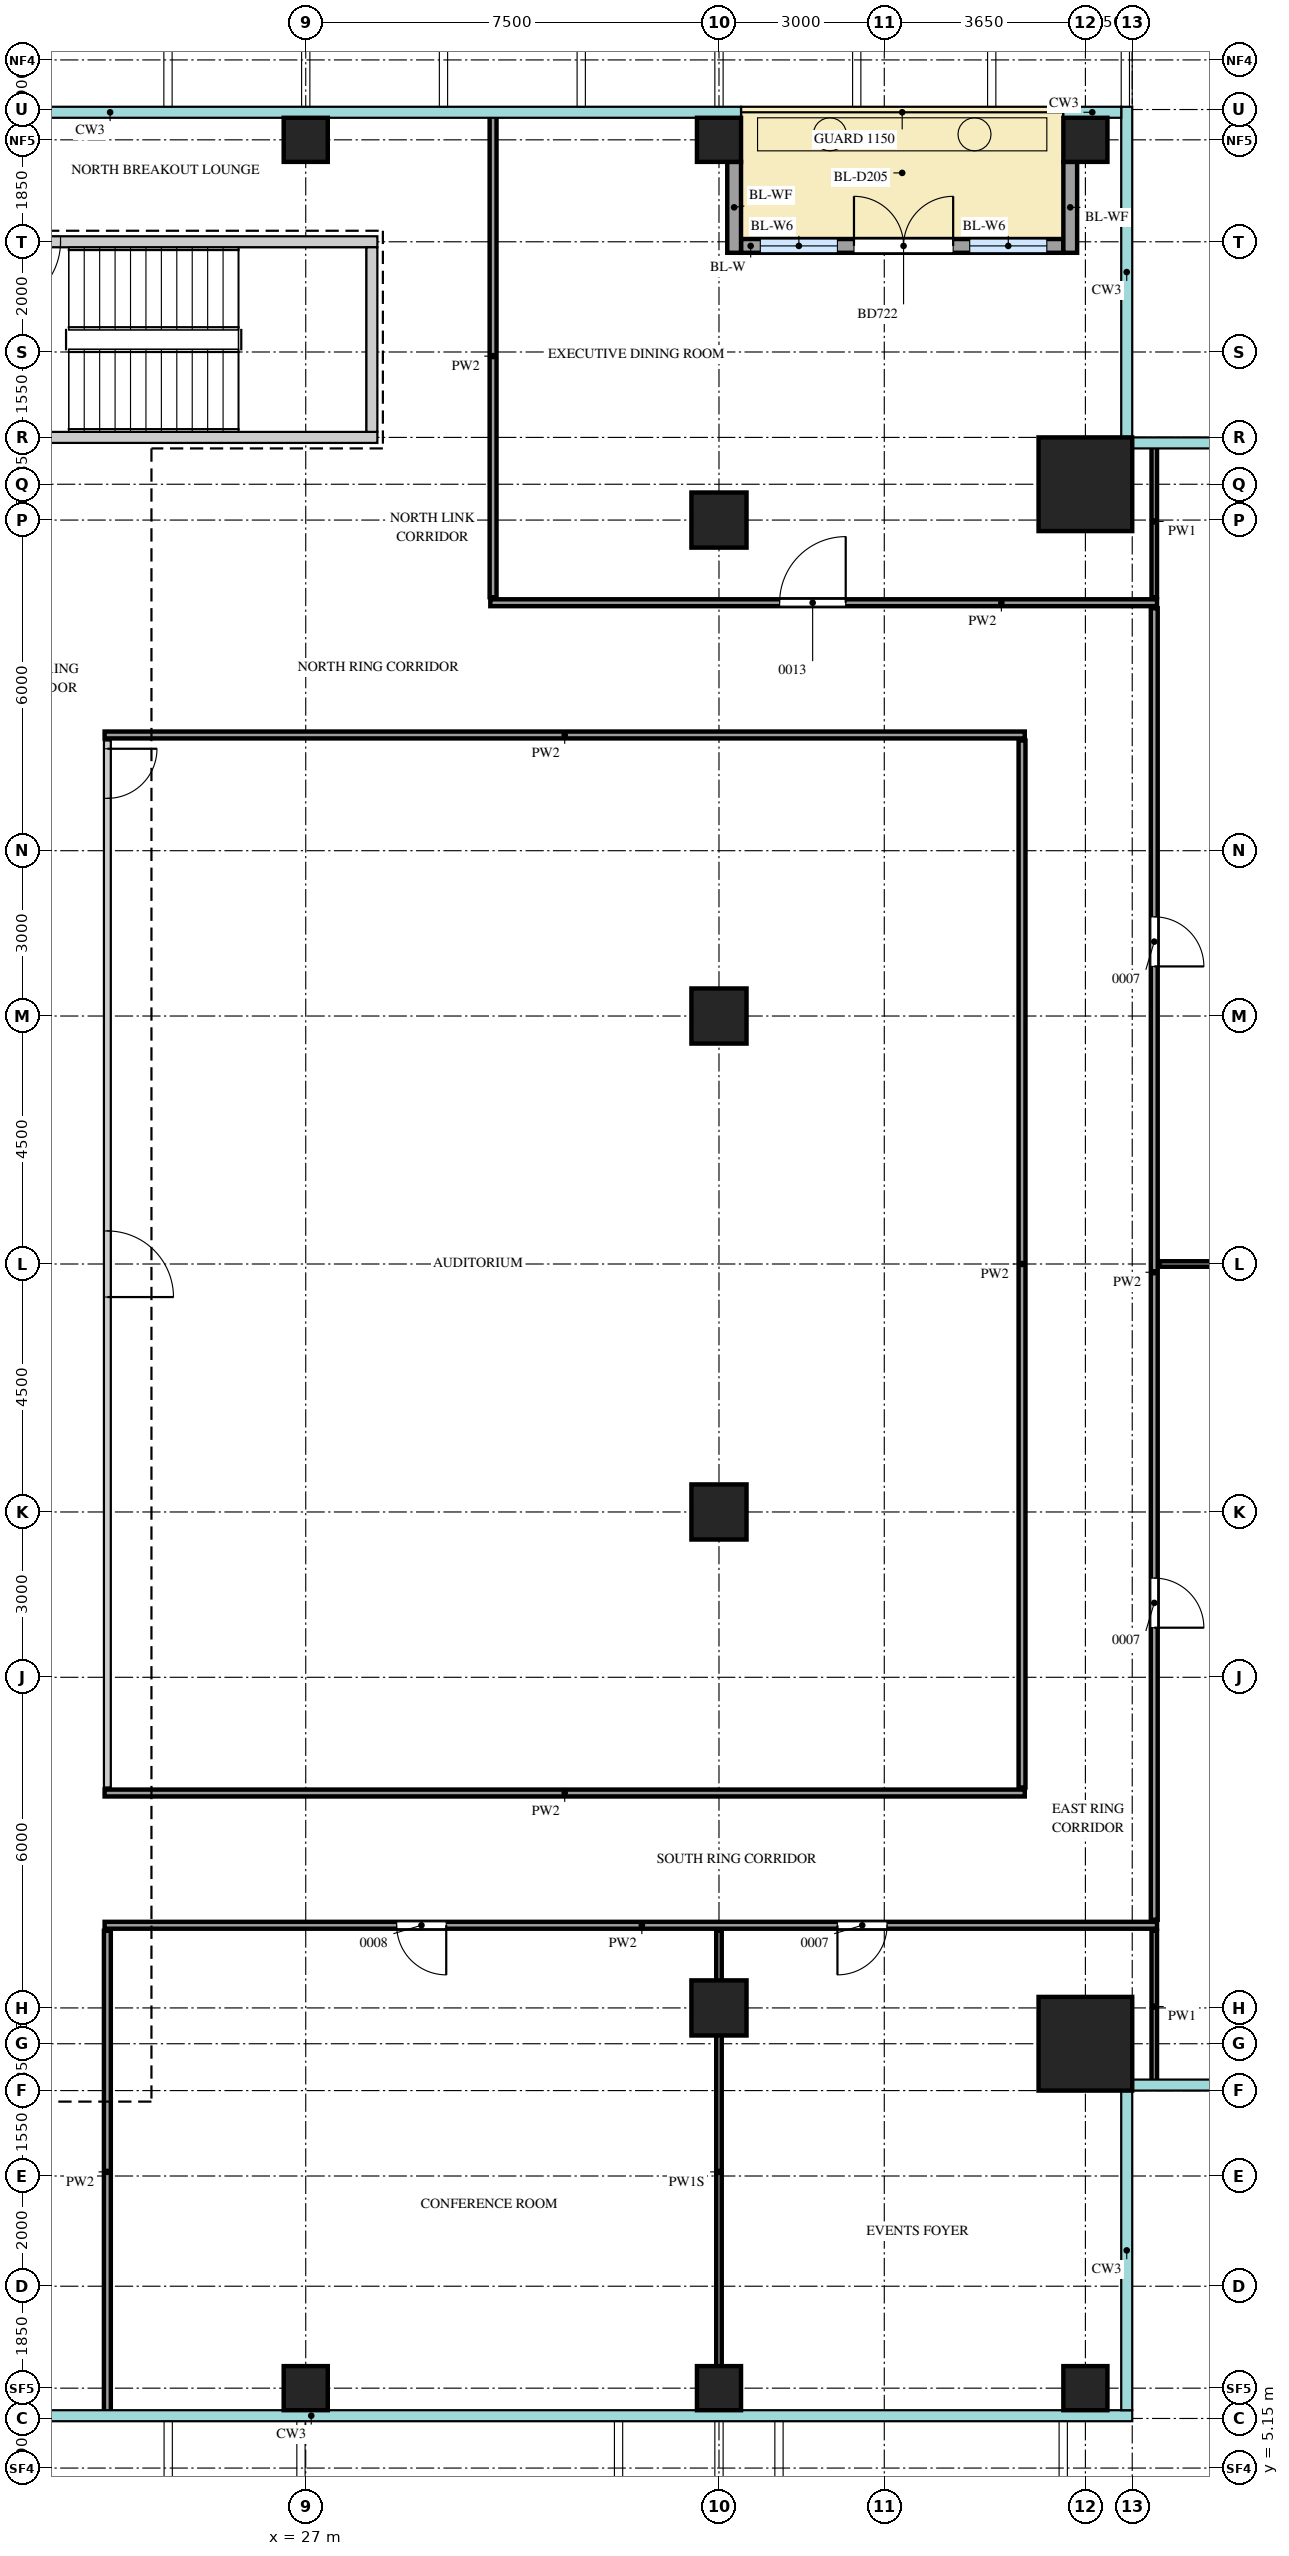
"""IFC4 building model, lengths in metres.
Left out: names, types, materials, properties, quantities, classifications, styles, units other than length and angle.
Written with IfcOpenShell. Run it as: python <this file> out.ifc"""

import sys

from ifc_helpers import new_model, si_unit, direction, frame, frame_2d, origin, origin_2d, place, context, subcontext, project, spatial, rectangle, extrude, source, transform, mapped, element, fill, save


model = new_model("IFC4")
c1 = context("Model", 3, precision=1e-05, world=origin(), true_north=direction((0.0, 1.0)))
c2 = subcontext(c1, "Body", "Model", "MODEL_VIEW")
j1 = project(units=[si_unit("LENGTHUNIT", "METRE"), si_unit("PLANEANGLEUNIT", "RADIAN")], contexts=[c1])
p1 = place(None, origin())
s1 = spatial("IfcSite", under=j1, at=p1, CompositionType="ELEMENT")
p2 = place(p1, origin())
s2 = spatial("IfcBuilding", under=s1, at=p2, CompositionType="ELEMENT")
p3 = place(p2, frame((0.0, 0.0, 318.2)))
s3 = spatial("IfcBuildingStorey", under=s2, at=p3, CompositionType="ELEMENT", Elevation=318.2)
m1 = source(origin(), c2, "Body", "SweptSolid", [
    extrude(rectangle(XDim=7.1, YDim=0.2, at=frame_2d((3.55, 0.0))), origin(), (0.0, 0.0, 1.0), 3.75),
])
p4 = place(p3, frame((21.2, 45.55, 0.0), z_axis=(0.0, 0.0, 1.0), x_axis=(1.0, 0.0, 0.0)))
e1 = element("IfcWall", 1, at=p4, inside=s3, PredefinedType="SHEAR", context=c2, shape_type="MappedRepresentation", body=[
    mapped(m1, transform((0.0, 0.0, 0.0))),
])
m2 = source(origin(), c2, "Body", "SweptSolid", [
    extrude(rectangle(XDim=1.2, YDim=2.1, at=frame_2d((0.6, 1.05))), frame((0.0, 0.11, 0.0), z_axis=(0.0, -1.0, 0.0), x_axis=(1.0, 0.0, 0.0)), (0.0, 0.0, 1.0), 0.22),
])
p5 = place(p4, frame((0.15, 0.0, 0.0)))
e2 = element("IfcOpeningElement", 2, at=p5, cuts=e1, PredefinedType="OPENING", context=c2, shape_type="MappedRepresentation", body=[
    mapped(m2, transform((0.0, 0.0, 0.0))),
])
p6 = place(p3, frame((21.2, 42.0, 0.0), z_axis=(0.0, 0.0, 1.0), x_axis=(1.0, 0.0, 0.0)))
e3 = element("IfcWall", 3, at=p6, inside=s3, PredefinedType="SHEAR", context=c2, shape_type="MappedRepresentation", body=[
    mapped(m1, transform((0.0, 0.0, 0.0))),
])
m3 = source(origin(), c2, "Body", "SweptSolid", [
    extrude(rectangle(XDim=3.35, YDim=0.2, at=frame_2d((1.675, 0.0))), origin(), (0.0, 0.0, 1.0), 3.75),
])
p7 = place(p3, frame((28.2, 42.1, 0.0), z_axis=(0.0, 0.0, 1.0), x_axis=(0.0, 1.0, 0.0)))
e4 = element("IfcWall", 4, at=p7, inside=s3, PredefinedType="SHEAR", context=c2, shape_type="MappedRepresentation", body=[
    mapped(m3, transform((0.0, 0.0, 0.0))),
])
m4 = source(origin(), c2, "Body", "SweptSolid", [
    extrude(rectangle(XDim=1.7, YDim=1.7, at=origin_2d()), origin(), (0.0, 0.0, 1.0), 3.75),
])
for number, where, z_axis, x_axis in (
    (5, (41.15, 41.15, 0.0), (0.0, 0.0, 1.0), (1.0, 0.0, 0.0)),
    (6, (41.15, 12.85, 0.0), (0.0, 0.0, 1.0), (1.0, 0.0, 0.0)),
):
    element("IfcColumn", number, at=place(p3, frame(where, z_axis=z_axis, x_axis=x_axis)), inside=s3, PredefinedType="COLUMN", context=c2, shape_type="MappedRepresentation", body=[
        mapped(m4, transform((0.0, 0.0, 0.0))),
    ])
m5 = source(origin(), c2, "Body", "SweptSolid", [
    extrude(rectangle(XDim=0.8, YDim=0.8, at=origin_2d()), origin(), (0.0, 0.0, 1.0), 3.75),
])
for number, where, z_axis, x_axis in (
    (7, (27.0, 6.6, 0.0), (0.0, 0.0, 1.0), (1.0, 0.0, 0.0)),
    (8, (34.5, 6.6, 0.0), (0.0, 0.0, 1.0), (1.0, 0.0, 0.0)),
    (9, (41.15, 6.6, 0.0), (0.0, 0.0, 1.0), (1.0, 0.0, 0.0)),
    (10, (27.0, 47.4, 0.0), (0.0, 0.0, 1.0), (1.0, 0.0, 0.0)),
    (11, (34.5, 47.4, 0.0), (0.0, 0.0, 1.0), (1.0, 0.0, 0.0)),
    (12, (41.15, 47.4, 0.0), (0.0, 0.0, 1.0), (1.0, 0.0, 0.0)),
):
    element("IfcColumn", number, at=place(p3, frame(where, z_axis=z_axis, x_axis=x_axis)), inside=s3, PredefinedType="COLUMN", context=c2, shape_type="MappedRepresentation", body=[
        mapped(m5, transform((0.0, 0.0, 0.0))),
    ])
m6 = source(origin(), c2, "Body", "SweptSolid", [
    extrude(rectangle(XDim=1.0, YDim=1.0, at=origin_2d()), origin(), (0.0, 0.0, 1.0), 3.75),
])
for number, where, z_axis, x_axis in (
    (13, (34.5, 13.5, 0.0), (0.0, 0.0, 1.0), (1.0, 0.0, 0.0)),
    (14, (34.5, 22.5, 0.0), (0.0, 0.0, 1.0), (1.0, 0.0, 0.0)),
    (15, (34.5, 31.5, 0.0), (0.0, 0.0, 1.0), (1.0, 0.0, 0.0)),
    (16, (34.5, 40.5, 0.0), (0.0, 0.0, 1.0), (1.0, 0.0, 0.0)),
):
    element("IfcColumn", number, at=place(p3, frame(where, z_axis=z_axis, x_axis=x_axis)), inside=s3, PredefinedType="COLUMN", context=c2, shape_type="MappedRepresentation", body=[
        mapped(m6, transform((0.0, 0.0, 0.0))),
    ])
m7 = source(origin(), c2, "Body", "SweptSolid", [
    extrude(rectangle(XDim=5.85, YDim=0.25, at=frame_2d((2.925, 0.0))), origin(), (0.0, 0.0, 1.0), 3.75),
])
p8 = place(p3, frame((34.9, 45.475, 0.0), z_axis=(0.0, 0.0, 1.0), x_axis=(1.0, 0.0, 0.0)))
e17 = element("IfcWall", 17, at=p8, inside=s3, PredefinedType="SOLIDWALL", context=c2, shape_type="MappedRepresentation", body=[
    mapped(m7, transform((0.0, 0.0, 0.0))),
])
m8 = source(origin(), c2, "Body", "SweptSolid", [
    extrude(rectangle(XDim=1.4, YDim=2.4, at=frame_2d((0.7, 1.2))), frame((0.0, 0.135, 0.0), z_axis=(0.0, -1.0, 0.0), x_axis=(1.0, 0.0, 0.0)), (0.0, 0.0, 1.0), 0.27),
])
p9 = place(p8, frame((0.35, 0.0, 0.0)))
e18 = element("IfcOpeningElement", 18, at=p9, cuts=e17, PredefinedType="OPENING", context=c2, shape_type="MappedRepresentation", body=[
    mapped(m8, transform((0.0, 0.0, 0.0))),
])
p10 = place(p8, frame((4.15, 0.0, 0.0)))
e19 = element("IfcOpeningElement", 19, at=p10, cuts=e17, PredefinedType="OPENING", context=c2, shape_type="MappedRepresentation", body=[
    mapped(m8, transform((0.0, 0.0, 0.0))),
])
m9 = source(origin(), c2, "Body", "SweptSolid", [
    extrude(rectangle(XDim=1.8, YDim=2.4, at=frame_2d((0.9, 1.2))), frame((0.0, 0.135, 0.0), z_axis=(0.0, -1.0, 0.0), x_axis=(1.0, 0.0, 0.0)), (0.0, 0.0, 1.0), 0.27),
])
p11 = place(p8, frame((2.05, 0.0, 0.0)))
e20 = element("IfcOpeningElement", 20, at=p11, cuts=e17, PredefinedType="OPENING", context=c2, shape_type="MappedRepresentation", body=[
    mapped(m9, transform((0.0, 0.0, 0.0))),
])
m10 = source(origin(), c2, "Body", "SweptSolid", [
    extrude(rectangle(XDim=1.65, YDim=0.25, at=frame_2d((0.825, 0.0))), origin(), (0.0, 0.0, 1.0), 3.45),
])
for number, where, z_axis, x_axis in (
    (21, (34.775, 47.0, 0.0), (0.0, 0.0, 1.0), (0.0, -1.0, 0.0)),
    (22, (40.875, 47.0, 0.0), (0.0, 0.0, 1.0), (0.0, -1.0, 0.0)),
):
    element("IfcWall", number, at=place(p3, frame(where, z_axis=z_axis, x_axis=x_axis)), inside=s3, PredefinedType="SOLIDWALL", context=c2, shape_type="MappedRepresentation", body=[
        mapped(m10, transform((0.0, 0.0, 0.0))),
    ])
m11 = source(origin(), c2, "Body", "SweptSolid", [
    extrude(rectangle(XDim=8.75, YDim=0.125, at=frame_2d((4.375, 0.0))), origin(), (0.0, 0.0, 1.0), 3.8),
])
p12 = place(p3, frame((23.4, 6.15, 0.0), z_axis=(0.0, 0.0, 1.0), x_axis=(0.0, 1.0, 0.0)))
e23 = element("IfcWall", 23, at=p12, inside=s3, PredefinedType="PARTITIONING", context=c2, shape_type="MappedRepresentation", body=[
    mapped(m11, transform((0.0, 0.0, 0.0))),
])
m12 = source(origin(), c2, "Body", "SweptSolid", [
    extrude(rectangle(XDim=8.75, YDim=0.1, at=frame_2d((4.375, 0.0))), origin(), (0.0, 0.0, 1.0), 3.35),
])
p13 = place(p3, frame((34.5, 6.15, 0.0), z_axis=(0.0, 0.0, 1.0), x_axis=(0.0, 1.0, 0.0)))
e24 = element("IfcWall", 24, at=p13, inside=s3, PredefinedType="PARTITIONING", context=c2, shape_type="MappedRepresentation", body=[
    mapped(m12, transform((0.0, 0.0, 0.0))),
])
m13 = source(origin(), c2, "Body", "SweptSolid", [
    extrude(rectangle(XDim=2.75, YDim=0.1, at=frame_2d((1.375, 0.0))), origin(), (0.0, 0.0, 1.0), 3.8),
])
p14 = place(p3, frame((42.4, 12.15, 0.0), z_axis=(0.0, 0.0, 1.0), x_axis=(0.0, 1.0, 0.0)))
e25 = element("IfcWall", 25, at=p14, inside=s3, PredefinedType="PARTITIONING", context=c2, shape_type="MappedRepresentation", body=[
    mapped(m13, transform((0.0, 0.0, 0.0))),
])
m14 = source(origin(), c2, "Body", "SweptSolid", [
    extrude(rectangle(XDim=19.1, YDim=0.125, at=frame_2d((9.55, 0.0))), origin(), (0.0, 0.0, 1.0), 3.8),
])
p15 = place(p3, frame((23.35, 15.0, 0.0), z_axis=(0.0, 0.0, 1.0), x_axis=(1.0, 0.0, 0.0)))
e26 = element("IfcWall", 26, at=p15, inside=s3, PredefinedType="PARTITIONING", context=c2, shape_type="MappedRepresentation", body=[
    mapped(m14, transform((0.0, 0.0, 0.0))),
])
m15 = source(origin(), c2, "Body", "SweptSolid", [
    extrude(rectangle(XDim=0.9, YDim=2.1, at=frame_2d((0.45, 1.05))), frame((0.0, 0.073, 0.0), z_axis=(0.0, -1.0, 0.0), x_axis=(1.0, 0.0, 0.0)), (0.0, 0.0, 1.0), 0.145),
])
p16 = place(p15, frame((5.3, 0.0, 0.0)))
e27 = element("IfcOpeningElement", 27, at=p16, cuts=e26, PredefinedType="OPENING", context=c2, shape_type="MappedRepresentation", body=[
    mapped(m15, transform((0.0, 0.0, 0.0))),
])
p17 = place(p15, frame((13.3, 0.0, 0.0)))
e28 = element("IfcOpeningElement", 28, at=p17, cuts=e26, PredefinedType="OPENING", context=c2, shape_type="MappedRepresentation", body=[
    mapped(m15, transform((0.0, 0.0, 0.0))),
])
m16 = source(origin(), c2, "Body", "SweptSolid", [
    extrude(rectangle(XDim=23.8, YDim=0.125, at=frame_2d((11.9, 0.0))), origin(), (0.0, 0.0, 1.0), 3.8),
])
p18 = place(p3, frame((42.4, 15.1, 0.0), z_axis=(0.0, 0.0, 1.0), x_axis=(0.0, 1.0, 0.0)))
e29 = element("IfcWall", 29, at=p18, inside=s3, PredefinedType="PARTITIONING", context=c2, shape_type="MappedRepresentation", body=[
    mapped(m16, transform((0.0, 0.0, 0.0))),
])
p19 = place(p18, frame((5.3, 0.0, 0.0)))
e30 = element("IfcOpeningElement", 30, at=p19, cuts=e29, PredefinedType="OPENING", context=c2, shape_type="MappedRepresentation", body=[
    mapped(m15, transform((0.0, 0.0, 0.0))),
])
p20 = place(p18, frame((17.3, 0.0, 0.0)))
e31 = element("IfcOpeningElement", 31, at=p20, cuts=e29, PredefinedType="OPENING", context=c2, shape_type="MappedRepresentation", body=[
    mapped(m15, transform((0.0, 0.0, 0.0))),
])
m17 = source(origin(), c2, "Body", "SweptSolid", [
    extrude(rectangle(XDim=16.7, YDim=0.125, at=frame_2d((8.35, 0.0))), origin(), (0.0, 0.0, 1.0), 3.8),
])
p21 = place(p3, frame((23.35, 17.4, 0.0), z_axis=(0.0, 0.0, 1.0), x_axis=(1.0, 0.0, 0.0)))
e32 = element("IfcWall", 32, at=p21, inside=s3, PredefinedType="PARTITIONING", context=c2, shape_type="MappedRepresentation", body=[
    mapped(m17, transform((0.0, 0.0, 0.0))),
])
m18 = source(origin(), c2, "Body", "SweptSolid", [
    extrude(rectangle(XDim=19.0, YDim=0.125, at=frame_2d((9.5, 0.0))), origin(), (0.0, 0.0, 1.0), 3.8),
])
p22 = place(p3, frame((23.4, 17.5, 0.0), z_axis=(0.0, 0.0, 1.0), x_axis=(0.0, 1.0, 0.0)))
e33 = element("IfcWall", 33, at=p22, inside=s3, PredefinedType="PARTITIONING", context=c2, shape_type="MappedRepresentation", body=[
    mapped(m18, transform((0.0, 0.0, 0.0))),
])
m19 = source(origin(), c2, "Body", "SweptSolid", [
    extrude(rectangle(XDim=1.2, YDim=2.1, at=frame_2d((0.6, 1.05))), frame((0.0, 0.073, 0.0), z_axis=(0.0, -1.0, 0.0), x_axis=(1.0, 0.0, 0.0)), (0.0, 0.0, 1.0), 0.145),
])
p23 = place(p22, frame((8.9, 0.0, 0.0)))
e34 = element("IfcOpeningElement", 34, at=p23, cuts=e33, PredefinedType="OPENING", context=c2, shape_type="MappedRepresentation", body=[
    mapped(m19, transform((0.0, 0.0, 0.0))),
])
p24 = place(p22, frame((17.95, 0.0, 0.0)))
e35 = element("IfcOpeningElement", 35, at=p24, cuts=e33, PredefinedType="OPENING", context=c2, shape_type="MappedRepresentation", body=[
    mapped(m15, transform((0.0, 0.0, 0.0))),
])
p25 = place(p3, frame((40.0, 17.5, 0.0), z_axis=(0.0, 0.0, 1.0), x_axis=(0.0, 1.0, 0.0)))
e36 = element("IfcWall", 36, at=p25, inside=s3, PredefinedType="PARTITIONING", context=c2, shape_type="MappedRepresentation", body=[
    mapped(m18, transform((0.0, 0.0, 0.0))),
])
m20 = source(origin(), c2, "Body", "SweptSolid", [
    extrude(rectangle(XDim=5.35, YDim=0.1, at=frame_2d((2.675, 0.0))), origin(), (0.0, 0.0, 1.0), 3.8),
])
p26 = place(p3, frame((42.5, 27.0, 0.0), z_axis=(0.0, 0.0, 1.0), x_axis=(1.0, 0.0, 0.0)))
e37 = element("IfcWall", 37, at=p26, inside=s3, PredefinedType="PARTITIONING", context=c2, shape_type="MappedRepresentation", body=[
    mapped(m20, transform((0.0, 0.0, 0.0))),
])
p27 = place(p3, frame((23.35, 36.6, 0.0), z_axis=(0.0, 0.0, 1.0), x_axis=(1.0, 0.0, 0.0)))
e38 = element("IfcWall", 38, at=p27, inside=s3, PredefinedType="PARTITIONING", context=c2, shape_type="MappedRepresentation", body=[
    mapped(m17, transform((0.0, 0.0, 0.0))),
])
m21 = source(origin(), c2, "Body", "SweptSolid", [
    extrude(rectangle(XDim=12.1, YDim=0.125, at=frame_2d((6.05, 0.0))), origin(), (0.0, 0.0, 1.0), 3.8),
])
p28 = place(p3, frame((30.35, 39.0, 0.0), z_axis=(0.0, 0.0, 1.0), x_axis=(1.0, 0.0, 0.0)))
e39 = element("IfcWall", 39, at=p28, inside=s3, PredefinedType="PARTITIONING", context=c2, shape_type="MappedRepresentation", body=[
    mapped(m21, transform((0.0, 0.0, 0.0))),
])
p29 = place(p28, frame((5.25, 0.0, 0.0)))
e40 = element("IfcOpeningElement", 40, at=p29, cuts=e39, PredefinedType="OPENING", context=c2, shape_type="MappedRepresentation", body=[
    mapped(m19, transform((0.0, 0.0, 0.0))),
])
p30 = place(p3, frame((30.4, 39.1, 0.0), z_axis=(0.0, 0.0, 1.0), x_axis=(0.0, 1.0, 0.0)))
e41 = element("IfcWall", 41, at=p30, inside=s3, PredefinedType="PARTITIONING", context=c2, shape_type="MappedRepresentation", body=[
    mapped(m11, transform((0.0, 0.0, 0.0))),
])
p31 = place(p3, frame((42.4, 39.1, 0.0), z_axis=(0.0, 0.0, 1.0), x_axis=(0.0, 1.0, 0.0)))
e42 = element("IfcWall", 42, at=p31, inside=s3, PredefinedType="PARTITIONING", context=c2, shape_type="MappedRepresentation", body=[
    mapped(m13, transform((0.0, 0.0, 0.0))),
])
m22 = source(origin(), c2, "Body", "SweptSolid", [
    extrude(rectangle(XDim=1.4, YDim=2.4, at=frame_2d((0.7, 1.2))), frame((0.0, 0.03, 0.0), z_axis=(0.0, -1.0, 0.0), x_axis=(1.0, 0.0, 0.0)), (0.0, 0.0, 1.0), 0.06),
])
p32 = place(p9, origin())
e43 = element("IfcWindow", 43, at=p32, inside=s3, PartitioningType="SINGLE_PANEL", PredefinedType="WINDOW", context=c2, shape_type="MappedRepresentation", body=[
    mapped(m22, transform((0.0, 0.0, 0.0))),
])
fill(e18, e43)
p33 = place(p10, origin())
e44 = element("IfcWindow", 44, at=p33, inside=s3, PartitioningType="SINGLE_PANEL", PredefinedType="WINDOW", context=c2, shape_type="MappedRepresentation", body=[
    mapped(m22, transform((0.0, 0.0, 0.0))),
])
fill(e19, e44)
m23 = source(origin(), c2, "Body", "SweptSolid", [
    extrude(rectangle(XDim=1.8, YDim=2.4, at=frame_2d((0.9, 1.2))), frame((0.0, 0.025, 0.0), z_axis=(0.0, -1.0, 0.0), x_axis=(1.0, 0.0, 0.0)), (0.0, 0.0, 1.0), 0.05),
])
p34 = place(p11, origin())
e45 = element("IfcDoor", 45, at=p34, inside=s3, OperationType="DOUBLE_DOOR_DOUBLE_SWING", PredefinedType="DOOR", context=c2, shape_type="MappedRepresentation", body=[
    mapped(m23, transform((0.0, 0.0, 0.0))),
])
fill(e20, e45)
m24 = source(origin(), c2, "Body", "SweptSolid", [
    extrude(rectangle(XDim=0.9, YDim=2.1, at=frame_2d((0.45, 1.05))), frame((0.0, 0.025, 0.0), z_axis=(0.0, -1.0, 0.0), x_axis=(1.0, 0.0, 0.0)), (0.0, 0.0, 1.0), 0.05),
])
p35 = place(p16, origin())
e46 = element("IfcDoor", 46, at=p35, inside=s3, OperationType="SINGLE_SWING_RIGHT", PredefinedType="DOOR", context=c2, shape_type="MappedRepresentation", body=[
    mapped(m24, transform((0.0, 0.0, 0.0))),
])
fill(e27, e46)
p36 = place(p17, origin())
e47 = element("IfcDoor", 47, at=p36, inside=s3, OperationType="SINGLE_SWING_LEFT", PredefinedType="DOOR", context=c2, shape_type="MappedRepresentation", body=[
    mapped(m24, transform((0.0, 0.0, 0.0))),
])
fill(e28, e47)
p37 = place(p19, origin())
e48 = element("IfcDoor", 48, at=p37, inside=s3, OperationType="SINGLE_SWING_LEFT", PredefinedType="DOOR", context=c2, shape_type="MappedRepresentation", body=[
    mapped(m24, transform((0.0, 0.0, 0.0))),
])
fill(e30, e48)
p38 = place(p20, origin())
e49 = element("IfcDoor", 49, at=p38, inside=s3, OperationType="SINGLE_SWING_LEFT", PredefinedType="DOOR", context=c2, shape_type="MappedRepresentation", body=[
    mapped(m24, transform((0.0, 0.0, 0.0))),
])
fill(e31, e49)
m25 = source(origin(), c2, "Body", "SweptSolid", [
    extrude(rectangle(XDim=1.2, YDim=2.1, at=frame_2d((0.6, 1.05))), frame((0.0, 0.025, 0.0), z_axis=(0.0, -1.0, 0.0), x_axis=(1.0, 0.0, 0.0)), (0.0, 0.0, 1.0), 0.05),
])
p39 = place(p29, origin())
e50 = element("IfcDoor", 50, at=p39, inside=s3, OperationType="SINGLE_SWING_LEFT", PredefinedType="DOOR", context=c2, shape_type="MappedRepresentation", body=[
    mapped(m25, transform((0.0, 0.0, 0.0))),
])
fill(e40, e50)
p40 = place(p23, origin())
e51 = element("IfcDoor", 51, at=p40, inside=s3, OperationType="SINGLE_SWING_LEFT", PredefinedType="DOOR", context=c2, shape_type="MappedRepresentation", body=[
    mapped(m25, transform((0.0, 0.0, 0.0))),
])
fill(e34, e51)
p41 = place(p24, origin())
e52 = element("IfcDoor", 52, at=p41, inside=s3, OperationType="SINGLE_SWING_RIGHT", PredefinedType="DOOR", context=c2, shape_type="MappedRepresentation", body=[
    mapped(m24, transform((0.0, 0.0, 0.0))),
])
fill(e35, e52)
p42 = place(p5, origin())
e53 = element("IfcDoor", 53, at=p42, inside=s3, OperationType="SINGLE_SWING_LEFT", PredefinedType="DOOR", context=c2, shape_type="MappedRepresentation", body=[
    mapped(m25, transform((0.0, 0.0, 0.0))),
])
fill(e2, e53)
save(model, sys.argv[1])
